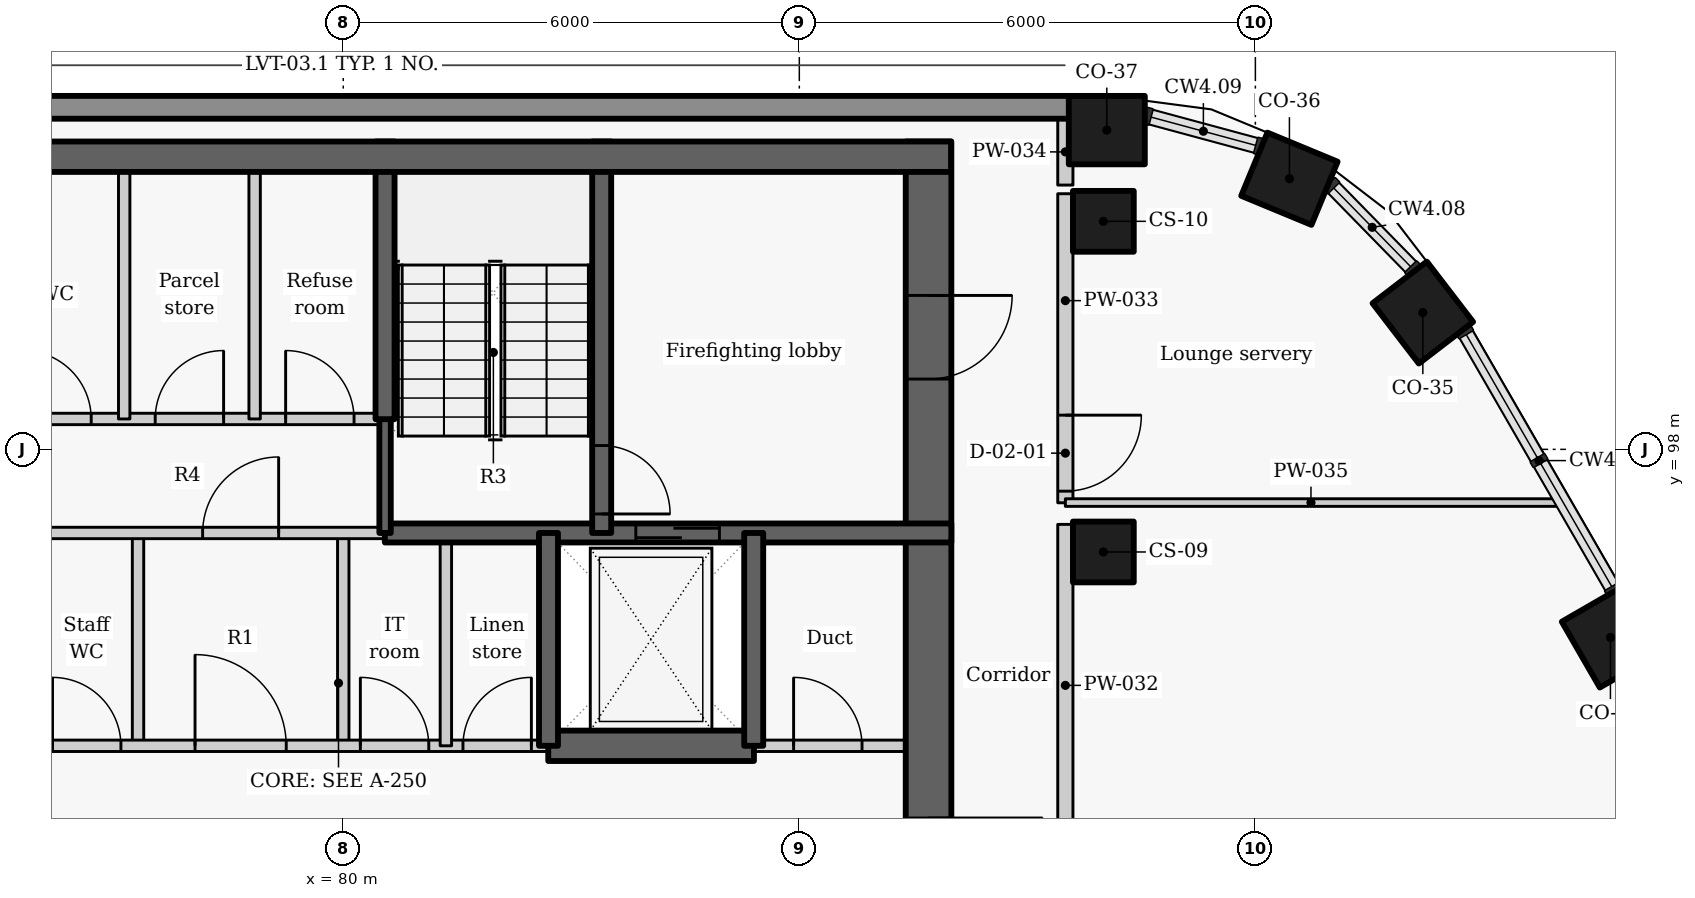
"""IFC4 building model, lengths in metres.
Left out: names, types, materials, properties, quantities, classifications, styles, units other than length and angle.
Written with IfcOpenShell. Run it as: python <this file> out.ifc"""

import sys

from ifc_helpers import new_model, si_unit, direction, frame, frame_2d, origin, origin_2d, place, context, subcontext, project, spatial, rectangle, extrude, element, fill, save


model = new_model("IFC4")
c1 = context("Model", 3, precision=1e-05, world=origin(), true_north=direction((0.0, 1.0)))
c2 = subcontext(c1, "Body", "Model", "MODEL_VIEW")
j1 = project(units=[si_unit("LENGTHUNIT", "METRE"), si_unit("PLANEANGLEUNIT", "RADIAN")], contexts=[c1])
p1 = place(None, origin())
s1 = spatial("IfcSite", under=j1, at=p1, CompositionType="ELEMENT")
p2 = place(p1, origin())
s2 = spatial("IfcBuilding", under=s1, at=p2, CompositionType="ELEMENT")
p3 = place(p2, frame((0.0, 0.0, 290.4)))
s3 = spatial("IfcBuildingStorey", under=s2, at=p3, CompositionType="ELEMENT", Elevation=290.4)
for number, where, z_axis, x_axis in (
    (1, (96.671, 95.525, 0.0), (0.0, 0.0, 1.0), (-0.5, 0.866, 0.0)),
    (2, (94.203, 99.8, 0.0), (0.0, 0.0, 1.0), (-0.609, 0.793, 0.0)),
    (3, (92.448, 101.56, 0.0), (0.0, 0.0, 1.0), (-0.924, 0.383, 0.0)),
    (4, (90.045, 102.2, 0.0), (0.0, 0.0, 1.0), (-1.0, 0.0, 0.0)),
):
    element("IfcColumn", number, at=place(p3, frame(where, z_axis=z_axis, x_axis=x_axis)), inside=s3, PredefinedType="COLUMN", context=c2, shape_type="SweptSolid", body=[
        extrude(rectangle(XDim=1.0, YDim=0.9, at=origin_2d()), origin(), (0.0, 0.0, 1.0), 3.6),
    ])
for number, where, z_axis, x_axis in (
    (5, (90.0, 96.65, 0.0), (0.0, 0.0, 1.0), (0.0, 1.0, 0.0)),
    (6, (90.0, 101.0, 0.0), (0.0, 0.0, 1.0), (0.0, 1.0, 0.0)),
):
    element("IfcColumn", number, at=place(p3, frame(where, z_axis=z_axis, x_axis=x_axis)), inside=s3, PredefinedType="COLUMN", context=c2, shape_type="SweptSolid", body=[
        extrude(rectangle(XDim=0.8, YDim=0.8, at=origin_2d()), origin(), (0.0, 0.0, 1.0), 3.6),
    ])
p4 = place(p3, frame((89.549, 102.5, 0.0), z_axis=(0.0, 0.0, 1.0), x_axis=(-1.0, 0.0, 0.0)))
e7 = element("IfcWall", 7, at=p4, inside=s3, PredefinedType="SOLIDWALL", context=c2, shape_type="SweptSolid", body=[
    extrude(rectangle(XDim=19.134, YDim=0.3, at=frame_2d((9.567, 0.0))), origin(), (0.0, 0.0, 1.0), 2.725),
])
for number, where, z_axis, x_axis in (
    (8, (77.3, 94.1, 0.0), (0.0, 0.0, 1.0), (0.0, 1.0, 0.0)),
    (9, (80.0, 94.1, 0.0), (0.0, 0.0, 1.0), (0.0, 1.0, 0.0)),
):
    element("IfcWall", number, at=place(p3, frame(where, z_axis=z_axis, x_axis=x_axis)), inside=s3, PredefinedType="PARTITIONING", context=c2, shape_type="SweptSolid", body=[
        extrude(rectangle(XDim=2.8, YDim=0.15, at=frame_2d((1.4, 0.0))), origin(), (0.0, 0.0, 1.0), 3.325),
    ])
p5 = place(p3, frame((72.0, 94.1, 0.0), z_axis=(0.0, 0.0, 1.0), x_axis=(1.0, 0.0, 0.0)))
e10 = element("IfcWall", 10, at=p5, inside=s3, PredefinedType="PARTITIONING", context=c2, shape_type="SweptSolid", body=[
    extrude(rectangle(XDim=10.703, YDim=0.15, at=frame_2d((5.352, 0.0))), origin(), (0.0, 0.0, 1.0), 3.325),
])
p6 = place(p5, frame((1.075, 0.0, 0.0)))
e11 = element("IfcOpeningElement", 11, at=p6, cuts=e10, PredefinedType="OPENING", context=c2, shape_type="SweptSolid", body=[
    extrude(rectangle(XDim=1.1, YDim=2.1, at=frame_2d((0.55, 1.05))), frame((0.0, 0.085, 0.0), z_axis=(0.0, -1.0, 0.0), x_axis=(1.0, 0.0, 0.0)), (0.0, 0.0, 1.0), 0.17),
])
p7 = place(p5, frame((2.825, 0.0, 0.0)))
e12 = element("IfcOpeningElement", 12, at=p7, cuts=e10, PredefinedType="OPENING", context=c2, shape_type="SweptSolid", body=[
    extrude(rectangle(XDim=0.9, YDim=2.1, at=frame_2d((0.45, 1.05))), frame((0.0, 0.085, 0.0), z_axis=(0.0, -1.0, 0.0), x_axis=(1.0, 0.0, 0.0)), (0.0, 0.0, 1.0), 0.17),
])
p8 = place(p5, frame((4.175, 0.0, 0.0)))
e13 = element("IfcOpeningElement", 13, at=p8, cuts=e10, PredefinedType="OPENING", context=c2, shape_type="SweptSolid", body=[
    extrude(rectangle(XDim=0.9, YDim=2.1, at=frame_2d((0.45, 1.05))), frame((0.0, 0.085, 0.0), z_axis=(0.0, -1.0, 0.0), x_axis=(1.0, 0.0, 0.0)), (0.0, 0.0, 1.0), 0.17),
])
p9 = place(p5, frame((6.05, 0.0, 0.0)))
e14 = element("IfcOpeningElement", 14, at=p9, cuts=e10, PredefinedType="OPENING", context=c2, shape_type="SweptSolid", body=[
    extrude(rectangle(XDim=1.2, YDim=2.1, at=frame_2d((0.6, 1.05))), frame((0.0, 0.085, 0.0), z_axis=(0.0, -1.0, 0.0), x_axis=(1.0, 0.0, 0.0)), (0.0, 0.0, 1.0), 0.17),
])
p10 = place(p5, frame((8.225, 0.0, 0.0)))
e15 = element("IfcOpeningElement", 15, at=p10, cuts=e10, PredefinedType="OPENING", context=c2, shape_type="SweptSolid", body=[
    extrude(rectangle(XDim=0.9, YDim=2.1, at=frame_2d((0.45, 1.05))), frame((0.0, 0.085, 0.0), z_axis=(0.0, -1.0, 0.0), x_axis=(1.0, 0.0, 0.0)), (0.0, 0.0, 1.0), 0.17),
])
p11 = place(p5, frame((9.575, 0.0, 0.0)))
e16 = element("IfcOpeningElement", 16, at=p11, cuts=e10, PredefinedType="OPENING", context=c2, shape_type="SweptSolid", body=[
    extrude(rectangle(XDim=0.9, YDim=2.1, at=frame_2d((0.45, 1.05))), frame((0.0, 0.085, 0.0), z_axis=(0.0, -1.0, 0.0), x_axis=(1.0, 0.0, 0.0)), (0.0, 0.0, 1.0), 0.17),
])
p12 = place(p3, frame((85.397, 94.1, 0.0), z_axis=(0.0, 0.0, 1.0), x_axis=(1.0, 0.0, 0.0)))
e17 = element("IfcWall", 17, at=p12, inside=s3, PredefinedType="PARTITIONING", context=c2, shape_type="SweptSolid", body=[
    extrude(rectangle(XDim=2.603, YDim=0.15, at=frame_2d((1.302, 0.0))), origin(), (0.0, 0.0, 1.0), 3.325),
])
p13 = place(p12, frame((0.528, 0.0, 0.0)))
e18 = element("IfcOpeningElement", 18, at=p13, cuts=e17, PredefinedType="OPENING", context=c2, shape_type="SweptSolid", body=[
    extrude(rectangle(XDim=0.9, YDim=2.1, at=frame_2d((0.45, 1.05))), frame((0.0, 0.085, 0.0), z_axis=(0.0, -1.0, 0.0), x_axis=(1.0, 0.0, 0.0)), (0.0, 0.0, 1.0), 0.17),
])
p14 = place(p3, frame((82.697, 94.1, -0.275), z_axis=(0.0, 0.0, 1.0), x_axis=(1.0, 0.0, 0.0)))
e19 = element("IfcWall", 19, at=p14, inside=s3, PredefinedType="SHEAR", context=c2, shape_type="SweptSolid", body=[
    extrude(rectangle(XDim=2.706, YDim=0.4, at=frame_2d((1.353, 0.0))), origin(), (0.0, 0.0, 1.0), 3.6),
])
p15 = place(p3, frame((87.7, 102.05, -0.275), z_axis=(0.0, 0.0, 1.0), x_axis=(0.0, -1.0, 0.0)))
e20 = element("IfcWall", 20, at=p15, inside=s3, PredefinedType="SHEAR", context=c2, shape_type="SweptSolid", body=[
    extrude(rectangle(XDim=11.35, YDim=0.6, at=frame_2d((5.675, 0.0))), origin(), (0.0, 0.0, 1.0), 3.6),
])
p16 = place(p15, frame((8.9, 0.0, 0.275)))
e21 = element("IfcOpeningElement", 21, at=p16, cuts=e20, PredefinedType="OPENING", context=c2, shape_type="SweptSolid", body=[
    extrude(rectangle(XDim=1.5, YDim=2.1, at=frame_2d((0.75, 1.05))), frame((0.0, 0.31, 0.0), z_axis=(0.0, -1.0, 0.0), x_axis=(1.0, 0.0, 0.0)), (0.0, 0.0, 1.0), 0.62),
])
p17 = place(p15, frame((2.025, 0.0, 0.275)))
e22 = element("IfcOpeningElement", 22, at=p17, cuts=e20, PredefinedType="OPENING", context=c2, shape_type="SweptSolid", body=[
    extrude(rectangle(XDim=1.1, YDim=2.1, at=frame_2d((0.55, 1.05))), frame((0.0, 0.31, 0.0), z_axis=(0.0, -1.0, 0.0), x_axis=(1.0, 0.0, 0.0)), (0.0, 0.0, 1.0), 0.62),
])
p18 = place(p3, frame((80.547, 96.9, -0.275), z_axis=(0.0, 0.0, 1.0), x_axis=(1.0, 0.0, 0.0)))
e23 = element("IfcWall", 23, at=p18, inside=s3, PredefinedType="SHEAR", context=c2, shape_type="SweptSolid", body=[
    extrude(rectangle(XDim=7.453, YDim=0.25, at=frame_2d((3.727, 0.0))), origin(), (0.0, 0.0, 1.0), 3.6),
])
p19 = place(p18, frame((3.302, 0.0, 0.275)))
e24 = element("IfcOpeningElement", 24, at=p19, cuts=e23, PredefinedType="OPENING", context=c2, shape_type="SweptSolid", body=[
    extrude(rectangle(XDim=1.1, YDim=2.1, at=frame_2d((0.55, 1.05))), frame((0.0, 0.135, 0.0), z_axis=(0.0, -1.0, 0.0), x_axis=(1.0, 0.0, 0.0)), (0.0, 0.0, 1.0), 0.27),
])
p20 = place(p3, frame((75.347, 96.9, 0.0), z_axis=(0.0, 0.0, 1.0), x_axis=(1.0, 0.0, 0.0)))
e25 = element("IfcWall", 25, at=p20, inside=s3, PredefinedType="PARTITIONING", context=c2, shape_type="SweptSolid", body=[
    extrude(rectangle(XDim=5.206, YDim=0.15, at=frame_2d((2.603, 0.0))), origin(), (0.0, 0.0, 1.0), 3.325),
])
p21 = place(p20, frame((2.803, 0.0, 0.0)))
e26 = element("IfcOpeningElement", 26, at=p21, cuts=e25, PredefinedType="OPENING", context=c2, shape_type="SweptSolid", body=[
    extrude(rectangle(XDim=1.0, YDim=2.1, at=frame_2d((0.5, 1.05))), frame((0.0, 0.085, 0.0), z_axis=(0.0, -1.0, 0.0), x_axis=(1.0, 0.0, 0.0)), (0.0, 0.0, 1.0), 0.17),
])
p22 = place(p3, frame((81.35, 94.1, 0.0), z_axis=(0.0, 0.0, 1.0), x_axis=(0.0, 1.0, 0.0)))
e27 = element("IfcWall", 27, at=p22, inside=s3, PredefinedType="PARTITIONING", context=c2, shape_type="SweptSolid", body=[
    extrude(rectangle(XDim=2.8, YDim=0.15, at=frame_2d((1.4, 0.0))), origin(), (0.0, 0.0, 1.0), 3.325),
])
for number, where, z_axis, x_axis in (
    (28, (82.7, 94.1, -0.275), (0.0, 0.0, 1.0), (0.0, 1.0, 0.0)),
    (29, (85.4, 94.1, -0.275), (0.0, 0.0, 1.0), (0.0, 1.0, 0.0)),
):
    element("IfcWall", number, at=place(p3, frame(where, z_axis=z_axis, x_axis=x_axis)), inside=s3, PredefinedType="SHEAR", context=c2, shape_type="SweptSolid", body=[
        extrude(rectangle(XDim=2.8, YDim=0.25, at=frame_2d((1.4, 0.0))), origin(), (0.0, 0.0, 1.0), 3.6),
    ])
p23 = place(p3, frame((83.4, 102.05, -0.275), z_axis=(0.0, 0.0, 1.0), x_axis=(0.0, -1.0, 0.0)))
e30 = element("IfcWall", 30, at=p23, inside=s3, PredefinedType="SHEAR", context=c2, shape_type="SweptSolid", body=[
    extrude(rectangle(XDim=5.15, YDim=0.25, at=frame_2d((2.575, 0.0))), origin(), (0.0, 0.0, 1.0), 3.6),
])
p24 = place(p23, frame((4.0, 0.0, 0.275)))
e31 = element("IfcOpeningElement", 31, at=p24, cuts=e30, PredefinedType="OPENING", context=c2, shape_type="SweptSolid", body=[
    extrude(rectangle(XDim=0.9, YDim=2.1, at=frame_2d((0.45, 1.05))), frame((0.0, 0.135, 0.0), z_axis=(0.0, -1.0, 0.0), x_axis=(1.0, 0.0, 0.0)), (0.0, 0.0, 1.0), 0.27),
])
p25 = place(p3, frame((80.55, 96.9, -0.275), z_axis=(0.0, 0.0, 1.0), x_axis=(0.0, 1.0, 0.0)))
e32 = element("IfcWall", 32, at=p25, inside=s3, PredefinedType="SHEAR", context=c2, shape_type="SweptSolid", body=[
    extrude(rectangle(XDim=1.503, YDim=0.15, at=frame_2d((0.751, 0.0))), origin(), (0.0, 0.0, 1.0), 3.6),
])
p26 = place(p3, frame((80.55, 98.397, -0.275), z_axis=(0.0, 0.0, 1.0), x_axis=(0.0, 1.0, 0.0)))
e33 = element("IfcWall", 33, at=p26, inside=s3, PredefinedType="SHEAR", context=c2, shape_type="SweptSolid", body=[
    extrude(rectangle(XDim=3.653, YDim=0.25, at=frame_2d((1.827, 0.0))), origin(), (0.0, 0.0, 1.0), 3.6),
])
p27 = place(p3, frame((75.35, 98.4, 0.0), z_axis=(0.0, 0.0, 1.0), x_axis=(1.0, 0.0, 0.0)))
e34 = element("IfcWall", 34, at=p27, inside=s3, PredefinedType="PARTITIONING", context=c2, shape_type="SweptSolid", body=[
    extrude(rectangle(XDim=5.2, YDim=0.15, at=frame_2d((2.6, 0.0))), origin(), (0.0, 0.0, 1.0), 3.325),
])
p28 = place(p27, frame((0.434, 0.0, 0.0)))
e35 = element("IfcOpeningElement", 35, at=p28, cuts=e34, PredefinedType="OPENING", context=c2, shape_type="SweptSolid", body=[
    extrude(rectangle(XDim=0.9, YDim=2.1, at=frame_2d((0.45, 1.05))), frame((0.0, 0.085, 0.0), z_axis=(0.0, -1.0, 0.0), x_axis=(1.0, 0.0, 0.0)), (0.0, 0.0, 1.0), 0.17),
])
p29 = place(p27, frame((2.176, 0.0, 0.0)))
e36 = element("IfcOpeningElement", 36, at=p29, cuts=e34, PredefinedType="OPENING", context=c2, shape_type="SweptSolid", body=[
    extrude(rectangle(XDim=0.9, YDim=2.1, at=frame_2d((0.45, 1.05))), frame((0.0, 0.085, 0.0), z_axis=(0.0, -1.0, 0.0), x_axis=(1.0, 0.0, 0.0)), (0.0, 0.0, 1.0), 0.17),
])
p30 = place(p27, frame((3.892, 0.0, 0.0)))
e37 = element("IfcOpeningElement", 37, at=p30, cuts=e34, PredefinedType="OPENING", context=c2, shape_type="SweptSolid", body=[
    extrude(rectangle(XDim=0.9, YDim=2.1, at=frame_2d((0.45, 1.05))), frame((0.0, 0.085, 0.0), z_axis=(0.0, -1.0, 0.0), x_axis=(1.0, 0.0, 0.0)), (0.0, 0.0, 1.0), 0.17),
])
for number, where, z_axis, x_axis in (
    (38, (77.118, 98.4, 0.0), (0.0, 0.0, 1.0), (0.0, 1.0, 0.0)),
    (39, (78.834, 98.4, 0.0), (0.0, 0.0, 1.0), (0.0, 1.0, 0.0)),
):
    element("IfcWall", number, at=place(p3, frame(where, z_axis=z_axis, x_axis=x_axis)), inside=s3, PredefinedType="PARTITIONING", context=c2, shape_type="SweptSolid", body=[
        extrude(rectangle(XDim=3.65, YDim=0.15, at=frame_2d((1.825, 0.0))), origin(), (0.0, 0.0, 1.0), 3.325),
    ])
p31 = place(p3, frame((89.5, 92.777, 0.0), z_axis=(0.0, 0.0, 1.0), x_axis=(0.0, 1.0, 0.0)))
e40 = element("IfcWall", 40, at=p31, inside=s3, PredefinedType="PARTITIONING", context=c2, shape_type="SweptSolid", body=[
    extrude(rectangle(XDim=4.236, YDim=0.2, at=frame_2d((2.118, 0.0))), origin(), (0.0, 0.0, 1.0), 3.325),
])
p32 = place(p3, frame((89.5, 101.363, 0.0), z_axis=(0.0, 0.0, 1.0), x_axis=(0.0, -1.0, 0.0)))
e41 = element("IfcWall", 41, at=p32, inside=s3, PredefinedType="PARTITIONING", context=c2, shape_type="SweptSolid", body=[
    extrude(rectangle(XDim=4.066, YDim=0.2, at=frame_2d((2.033, 0.0))), origin(), (0.0, 0.0, 1.0), 3.325),
])
p33 = place(p32, frame((2.913, 0.0, 0.0)))
e42 = element("IfcOpeningElement", 42, at=p33, cuts=e41, PredefinedType="OPENING", context=c2, shape_type="SweptSolid", body=[
    extrude(rectangle(XDim=1.0, YDim=2.1, at=frame_2d((0.5, 1.05))), frame((0.0, 0.11, 0.0), z_axis=(0.0, -1.0, 0.0), x_axis=(1.0, 0.0, 0.0)), (0.0, 0.0, 1.0), 0.22),
])
p34 = place(p3, frame((89.5, 101.477, 0.0), z_axis=(0.0, 0.0, 1.0), x_axis=(0.0, 1.0, 0.0)))
e43 = element("IfcWall", 43, at=p34, inside=s3, PredefinedType="PARTITIONING", context=c2, shape_type="SweptSolid", body=[
    extrude(rectangle(XDim=0.873, YDim=0.2, at=frame_2d((0.437, 0.0))), origin(), (0.0, 0.0, 1.0), 3.325),
])
p35 = place(p3, frame((89.5, 97.3, 0.0), z_axis=(0.0, 0.0, 1.0), x_axis=(1.0, 0.0, 0.0)))
e44 = element("IfcWall", 44, at=p35, inside=s3, PredefinedType="PARTITIONING", context=c2, shape_type="SweptSolid", body=[
    extrude(rectangle(XDim=6.463, YDim=0.1, at=frame_2d((3.231, 0.0))), origin(), (0.0, 0.0, 1.0), 2.705),
])
p36 = place(p3, frame((72.004, 101.85, -0.275), z_axis=(0.0, 0.0, 1.0), x_axis=(1.0, 0.0, 0.0)))
e45 = element("IfcWall", 45, at=p36, inside=s3, PredefinedType="SHEAR", context=c2, shape_type="SweptSolid", body=[
    extrude(rectangle(XDim=15.992, YDim=0.4, at=frame_2d((7.996, 0.0))), origin(), (0.0, 0.0, 1.0), 3.6),
])
p37 = place(p8, origin())
e46 = element("IfcDoor", 46, at=p37, inside=s3, OperationType="SINGLE_SWING_LEFT", PredefinedType="DOOR", context=c2, shape_type="SweptSolid", body=[
    extrude(rectangle(XDim=0.9, YDim=2.1, at=frame_2d((0.45, 1.05))), frame((0.0, 0.025, 0.0), z_axis=(0.0, -1.0, 0.0), x_axis=(1.0, 0.0, 0.0)), (0.0, 0.0, 1.0), 0.05),
])
fill(e13, e46)
p38 = place(p9, origin())
e47 = element("IfcDoor", 47, at=p38, inside=s3, OperationType="DOUBLE_DOOR_SINGLE_SWING", PredefinedType="DOOR", context=c2, shape_type="SweptSolid", body=[
    extrude(rectangle(XDim=1.2, YDim=2.1, at=frame_2d((0.6, 1.05))), frame((0.0, 0.025, 0.0), z_axis=(0.0, -1.0, 0.0), x_axis=(1.0, 0.0, 0.0)), (0.0, 0.0, 1.0), 0.05),
])
fill(e14, e47)
p39 = place(p10, origin())
e48 = element("IfcDoor", 48, at=p39, inside=s3, OperationType="SINGLE_SWING_LEFT", PredefinedType="DOOR", context=c2, shape_type="SweptSolid", body=[
    extrude(rectangle(XDim=0.9, YDim=2.1, at=frame_2d((0.45, 1.05))), frame((0.0, 0.025, 0.0), z_axis=(0.0, -1.0, 0.0), x_axis=(1.0, 0.0, 0.0)), (0.0, 0.0, 1.0), 0.05),
])
fill(e15, e48)
p40 = place(p11, origin())
e49 = element("IfcDoor", 49, at=p40, inside=s3, OperationType="SINGLE_SWING_RIGHT", PredefinedType="DOOR", context=c2, shape_type="SweptSolid", body=[
    extrude(rectangle(XDim=0.9, YDim=2.1, at=frame_2d((0.45, 1.05))), frame((0.0, 0.025, 0.0), z_axis=(0.0, -1.0, 0.0), x_axis=(1.0, 0.0, 0.0)), (0.0, 0.0, 1.0), 0.05),
])
fill(e16, e49)
p41 = place(p19, origin())
e50 = element("IfcDoor", 50, at=p41, inside=s3, OperationType="SLIDING_TO_LEFT", PredefinedType="DOOR", context=c2, shape_type="SweptSolid", body=[
    extrude(rectangle(XDim=1.1, YDim=2.1, at=frame_2d((0.55, 1.05))), frame((0.0, 0.025, 0.0), z_axis=(0.0, -1.0, 0.0), x_axis=(1.0, 0.0, 0.0)), (0.0, 0.0, 1.0), 0.05),
])
fill(e24, e50)
p42 = place(p13, origin())
e51 = element("IfcDoor", 51, at=p42, inside=s3, OperationType="SINGLE_SWING_LEFT", PredefinedType="DOOR", context=c2, shape_type="SweptSolid", body=[
    extrude(rectangle(XDim=0.9, YDim=2.1, at=frame_2d((0.45, 1.05))), frame((0.0, 0.025, 0.0), z_axis=(0.0, -1.0, 0.0), x_axis=(1.0, 0.0, 0.0)), (0.0, 0.0, 1.0), 0.05),
])
fill(e18, e51)
p43 = place(p21, origin())
e52 = element("IfcDoor", 52, at=p43, inside=s3, OperationType="SINGLE_SWING_RIGHT", PredefinedType="DOOR", context=c2, shape_type="SweptSolid", body=[
    extrude(rectangle(XDim=1.0, YDim=2.1, at=frame_2d((0.5, 1.05))), frame((0.0, 0.025, 0.0), z_axis=(0.0, -1.0, 0.0), x_axis=(1.0, 0.0, 0.0)), (0.0, 0.0, 1.0), 0.05),
])
fill(e26, e52)
p44 = place(p28, origin())
e53 = element("IfcDoor", 53, at=p44, inside=s3, OperationType="SINGLE_SWING_LEFT", PredefinedType="DOOR", context=c2, shape_type="SweptSolid", body=[
    extrude(rectangle(XDim=0.9, YDim=2.1, at=frame_2d((0.45, 1.05))), frame((0.0, 0.025, 0.0), z_axis=(0.0, -1.0, 0.0), x_axis=(1.0, 0.0, 0.0)), (0.0, 0.0, 1.0), 0.05),
])
fill(e35, e53)
p45 = place(p29, origin())
e54 = element("IfcDoor", 54, at=p45, inside=s3, OperationType="SINGLE_SWING_RIGHT", PredefinedType="DOOR", context=c2, shape_type="SweptSolid", body=[
    extrude(rectangle(XDim=0.9, YDim=2.1, at=frame_2d((0.45, 1.05))), frame((0.0, 0.025, 0.0), z_axis=(0.0, -1.0, 0.0), x_axis=(1.0, 0.0, 0.0)), (0.0, 0.0, 1.0), 0.05),
])
fill(e36, e54)
p46 = place(p30, origin())
e55 = element("IfcDoor", 55, at=p46, inside=s3, OperationType="SINGLE_SWING_LEFT", PredefinedType="DOOR", context=c2, shape_type="SweptSolid", body=[
    extrude(rectangle(XDim=0.9, YDim=2.1, at=frame_2d((0.45, 1.05))), frame((0.0, 0.025, 0.0), z_axis=(0.0, -1.0, 0.0), x_axis=(1.0, 0.0, 0.0)), (0.0, 0.0, 1.0), 0.05),
])
fill(e37, e55)
p47 = place(p24, origin())
e56 = element("IfcDoor", 56, at=p47, inside=s3, OperationType="SINGLE_SWING_RIGHT", PredefinedType="DOOR", context=c2, shape_type="SweptSolid", body=[
    extrude(rectangle(XDim=0.9, YDim=2.1, at=frame_2d((0.45, 1.05))), frame((0.0, 0.025, 0.0), z_axis=(0.0, -1.0, 0.0), x_axis=(1.0, 0.0, 0.0)), (0.0, 0.0, 1.0), 0.05),
])
fill(e31, e56)
p48 = place(p33, origin())
e57 = element("IfcDoor", 57, at=p48, inside=s3, OperationType="SINGLE_SWING_LEFT", PredefinedType="DOOR", context=c2, shape_type="SweptSolid", body=[
    extrude(rectangle(XDim=1.0, YDim=2.1, at=frame_2d((0.5, 1.05))), frame((0.0, 0.025, 0.0), z_axis=(0.0, -1.0, 0.0), x_axis=(1.0, 0.0, 0.0)), (0.0, 0.0, 1.0), 0.05),
])
fill(e42, e57)
p49 = place(p16, origin())
e58 = element("IfcDoor", 58, at=p49, inside=s3, OperationType="DOUBLE_DOOR_SINGLE_SWING", PredefinedType="DOOR", context=c2, shape_type="SweptSolid", body=[
    extrude(rectangle(XDim=1.5, YDim=2.1, at=frame_2d((0.75, 1.05))), frame((0.0, 0.025, 0.0), z_axis=(0.0, -1.0, 0.0), x_axis=(1.0, 0.0, 0.0)), (0.0, 0.0, 1.0), 0.05),
])
fill(e21, e58)
p50 = place(p17, origin())
e59 = element("IfcDoor", 59, at=p50, inside=s3, OperationType="SINGLE_SWING_LEFT", PredefinedType="DOOR", context=c2, shape_type="SweptSolid", body=[
    extrude(rectangle(XDim=1.1, YDim=2.1, at=frame_2d((0.55, 1.05))), frame((0.0, 0.025, 0.0), z_axis=(0.0, -1.0, 0.0), x_axis=(1.0, 0.0, 0.0)), (0.0, 0.0, 1.0), 0.05),
])
fill(e22, e59)
save(model, sys.argv[1])
